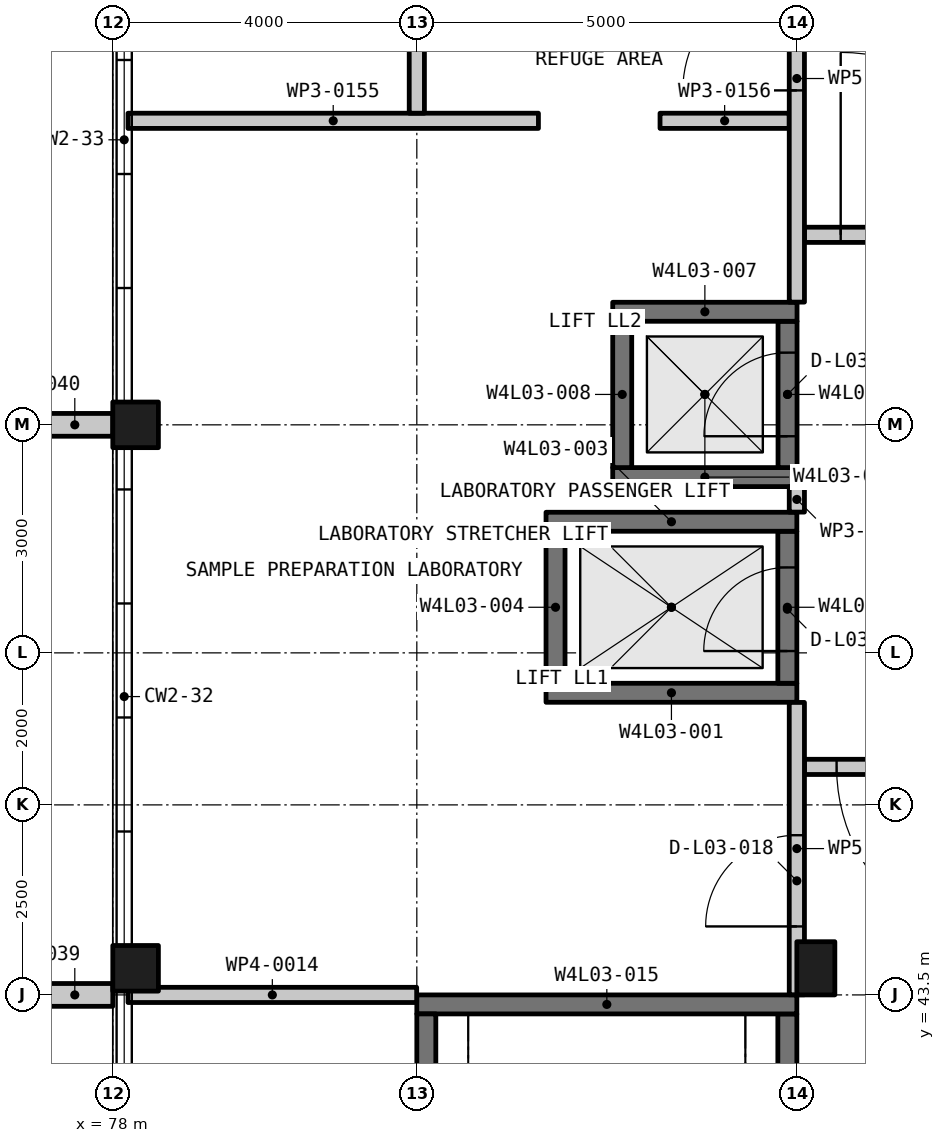
"""IFC4 building model, lengths in metres.
Left out: names, types, materials, properties, quantities, classifications, styles, units other than length and angle.
Written with IfcOpenShell. Run it as: python <this file> out.ifc"""

import sys

from ifc_helpers import new_model, si_unit, direction, frame, frame_2d, origin, origin_2d, place, context, subcontext, project, spatial, rectangle, extrude, element, fill, save


model = new_model("IFC4")
c1 = context("Model", 3, precision=1e-05, world=origin(), true_north=direction((0.0, 1.0)))
c2 = subcontext(c1, "Body", "Model", "MODEL_VIEW")
j1 = project(units=[si_unit("LENGTHUNIT", "METRE"), si_unit("PLANEANGLEUNIT", "RADIAN")], contexts=[c1])
p1 = place(None, origin())
s1 = spatial("IfcSite", under=j1, at=p1, CompositionType="ELEMENT")
p2 = place(p1, origin())
s2 = spatial("IfcBuilding", under=s1, at=p2, CompositionType="ELEMENT")
p3 = place(p2, frame((0.0, 0.0, 15.75)))
s3 = spatial("IfcBuildingStorey", under=s2, at=p3, CompositionType="ELEMENT", Elevation=15.75)
for number, where, z_axis, x_axis in (
    (1, (78.3, 43.85, -0.3), (0.0, 0.0, 1.0), (1.0, 0.0, 0.0)),
    (2, (78.3, 51.0, -0.3), (0.0, 0.0, 1.0), (1.0, 0.0, 0.0)),
):
    element("IfcColumn", number, at=place(p3, frame(where, z_axis=z_axis, x_axis=x_axis)), inside=s3, PredefinedType="COLUMN", context=c2, shape_type="SweptSolid", body=[
        extrude(rectangle(XDim=0.6, YDim=0.6, at=origin_2d()), origin(), (0.0, 0.0, 1.0), 4.5),
    ])
p4 = place(p3, frame((87.25, 43.85, -0.3), z_axis=(0.0, 0.0, 1.0), x_axis=(1.0, 0.0, 0.0)))
e3 = element("IfcColumn", 3, at=p4, inside=s3, PredefinedType="COLUMN", context=c2, shape_type="SweptSolid", body=[
    extrude(rectangle(XDim=0.5, YDim=0.7, at=origin_2d()), origin(), (0.0, 0.0, 1.0), 4.5),
])
p5 = place(p3, frame((83.7, 47.475, -0.3), z_axis=(0.0, 0.0, 1.0), x_axis=(1.0, 0.0, 0.0)))
e4 = element("IfcWall", 4, at=p5, inside=s3, PredefinedType="SHEAR", context=c2, shape_type="SweptSolid", body=[
    extrude(rectangle(XDim=3.3, YDim=0.25, at=frame_2d((1.65, 0.0))), origin(), (0.0, 0.0, 1.0), 4.5),
])
p6 = place(p3, frame((86.875, 47.6, -0.3), z_axis=(0.0, 0.0, 1.0), x_axis=(0.0, 1.0, 0.0)))
e5 = element("IfcWall", 5, at=p6, inside=s3, PredefinedType="SHEAR", context=c2, shape_type="SweptSolid", body=[
    extrude(rectangle(XDim=2.0, YDim=0.25, at=frame_2d((1.0, 0.0))), origin(), (0.0, 0.0, 1.0), 4.5),
])
p7 = place(p6, frame((0.424, 0.0, 0.3)))
e6 = element("IfcOpeningElement", 6, at=p7, cuts=e5, PredefinedType="OPENING", context=c2, shape_type="SweptSolid", body=[
    extrude(rectangle(XDim=1.1, YDim=2.1, at=frame_2d((0.55, 1.05))), frame((0.0, 0.135, 0.0), z_axis=(0.0, -1.0, 0.0), x_axis=(1.0, 0.0, 0.0)), (0.0, 0.0, 1.0), 0.27),
])
p8 = place(p3, frame((83.7, 49.725, -0.3), z_axis=(0.0, 0.0, 1.0), x_axis=(1.0, 0.0, 0.0)))
e7 = element("IfcWall", 7, at=p8, inside=s3, PredefinedType="SHEAR", context=c2, shape_type="SweptSolid", body=[
    extrude(rectangle(XDim=3.3, YDim=0.25, at=frame_2d((1.65, 0.0))), origin(), (0.0, 0.0, 1.0), 4.5),
])
p9 = place(p3, frame((83.825, 47.6, -0.3), z_axis=(0.0, 0.0, 1.0), x_axis=(0.0, 1.0, 0.0)))
e8 = element("IfcWall", 8, at=p9, inside=s3, PredefinedType="SHEAR", context=c2, shape_type="SweptSolid", body=[
    extrude(rectangle(XDim=2.0, YDim=0.25, at=frame_2d((1.0, 0.0))), origin(), (0.0, 0.0, 1.0), 4.5),
])
p10 = place(p3, frame((84.577, 50.312, -0.3), z_axis=(0.0, 0.0, 1.0), x_axis=(1.0, 0.0, 0.0)))
e9 = element("IfcWall", 9, at=p10, inside=s3, PredefinedType="SHEAR", context=c2, shape_type="SweptSolid", body=[
    extrude(rectangle(XDim=2.425, YDim=0.25, at=frame_2d((1.212, 0.0))), origin(), (0.0, 0.0, 1.0), 4.5),
])
p11 = place(p3, frame((86.877, 50.438, -0.3), z_axis=(0.0, 0.0, 1.0), x_axis=(0.0, 1.0, 0.0)))
e10 = element("IfcWall", 10, at=p11, inside=s3, PredefinedType="SHEAR", context=c2, shape_type="SweptSolid", body=[
    extrude(rectangle(XDim=1.925, YDim=0.25, at=frame_2d((0.962, 0.0))), origin(), (0.0, 0.0, 1.0), 4.5),
])
p12 = place(p11, frame((0.413, 0.0, 0.3)))
e11 = element("IfcOpeningElement", 11, at=p12, cuts=e10, PredefinedType="OPENING", context=c2, shape_type="SweptSolid", body=[
    extrude(rectangle(XDim=1.1, YDim=2.1, at=frame_2d((0.55, 1.05))), frame((0.0, 0.135, 0.0), z_axis=(0.0, -1.0, 0.0), x_axis=(1.0, 0.0, 0.0)), (0.0, 0.0, 1.0), 0.27),
])
p13 = place(p3, frame((84.577, 52.488, -0.3), z_axis=(0.0, 0.0, 1.0), x_axis=(1.0, 0.0, 0.0)))
e12 = element("IfcWall", 12, at=p13, inside=s3, PredefinedType="SHEAR", context=c2, shape_type="SweptSolid", body=[
    extrude(rectangle(XDim=2.425, YDim=0.25, at=frame_2d((1.212, 0.0))), origin(), (0.0, 0.0, 1.0), 4.5),
])
p14 = place(p3, frame((84.702, 50.438, -0.3), z_axis=(0.0, 0.0, 1.0), x_axis=(0.0, 1.0, 0.0)))
e13 = element("IfcWall", 13, at=p14, inside=s3, PredefinedType="SHEAR", context=c2, shape_type="SweptSolid", body=[
    extrude(rectangle(XDim=1.925, YDim=0.25, at=frame_2d((0.962, 0.0))), origin(), (0.0, 0.0, 1.0), 4.5),
])
p15 = place(p3, frame((86.875, 36.25, -0.3), z_axis=(0.0, 0.0, 1.0), x_axis=(0.0, 1.0, 0.0)))
e14 = element("IfcWall", 14, at=p15, inside=s3, PredefinedType="SHEAR", context=c2, shape_type="SweptSolid", body=[
    extrude(rectangle(XDim=7.0, YDim=0.25, at=frame_2d((3.5, 0.0))), origin(), (0.0, 0.0, 1.0), 4.5),
])
p16 = place(p3, frame((82.0, 43.375, -0.3), z_axis=(0.0, 0.0, 1.0), x_axis=(1.0, 0.0, 0.0)))
e15 = element("IfcWall", 15, at=p16, inside=s3, PredefinedType="SHEAR", context=c2, shape_type="SweptSolid", body=[
    extrude(rectangle(XDim=5.0, YDim=0.25, at=frame_2d((2.5, 0.0))), origin(), (0.0, 0.0, 1.0), 4.5),
])
p17 = place(p3, frame((82.125, 36.25, -0.3), z_axis=(0.0, 0.0, 1.0), x_axis=(0.0, 1.0, 0.0)))
e16 = element("IfcWall", 16, at=p17, inside=s3, PredefinedType="SHEAR", context=c2, shape_type="SweptSolid", body=[
    extrude(rectangle(XDim=7.0, YDim=0.25, at=frame_2d((3.5, 0.0))), origin(), (0.0, 0.0, 1.0), 4.5),
])
for number, where, z_axis, x_axis in (
    (17, (77.0, 43.5, 0.0), (0.0, 0.0, 1.0), (1.0, 0.0, 0.0)),
    (18, (77.0, 51.0, 0.0), (0.0, 0.0, 1.0), (1.0, 0.0, 0.0)),
):
    element("IfcWall", number, at=place(p3, frame(where, z_axis=z_axis, x_axis=x_axis)), inside=s3, PredefinedType="SOLIDWALL", context=c2, shape_type="SweptSolid", body=[
        extrude(rectangle(XDim=1.0, YDim=0.3, at=frame_2d((0.5, 0.0))), origin(), (0.0, 0.0, 1.0), 4.5),
    ])
p18 = place(p3, frame((78.2, 43.5, 0.0), z_axis=(0.0, 0.0, 1.0), x_axis=(1.0, 0.0, 0.0)))
e19 = element("IfcWall", 19, at=p18, inside=s3, PredefinedType="PARTITIONING", context=c2, shape_type="SweptSolid", body=[
    extrude(rectangle(XDim=3.798, YDim=0.2, at=frame_2d((1.899, 0.0))), origin(), (0.0, 0.0, 1.0), 3.4),
])
p19 = place(p3, frame((90.4, 46.5, 0.0), z_axis=(0.0, 0.0, 1.0), x_axis=(-1.0, 0.0, 0.0)))
e20 = element("IfcWall", 20, at=p19, inside=s3, PredefinedType="PARTITIONING", context=c2, shape_type="SweptSolid", body=[
    extrude(rectangle(XDim=3.3, YDim=0.2, at=frame_2d((1.65, 0.0))), origin(), (0.0, 0.0, 1.0), 3.4),
])
p20 = place(p19, frame((0.477, 0.0, 0.0)))
e21 = element("IfcOpeningElement", 21, at=p20, cuts=e20, PredefinedType="OPENING", context=c2, shape_type="SweptSolid", body=[
    extrude(rectangle(XDim=2.4, YDim=2.1, at=frame_2d((1.2, 1.05))), frame((0.0, 0.11, 0.0), z_axis=(0.0, -1.0, 0.0), x_axis=(1.0, 0.0, 0.0)), (0.0, 0.0, 1.0), 0.22),
])
p21 = place(p3, frame((87.1, 53.5, 0.0), z_axis=(0.0, 0.0, 1.0), x_axis=(1.0, 0.0, 0.0)))
e22 = element("IfcWall", 22, at=p21, inside=s3, PredefinedType="PARTITIONING", context=c2, shape_type="SweptSolid", body=[
    extrude(rectangle(XDim=3.3, YDim=0.2, at=frame_2d((1.65, 0.0))), origin(), (0.0, 0.0, 1.0), 3.4),
])
p22 = place(p21, frame((0.477, 0.0, 0.0)))
e23 = element("IfcOpeningElement", 23, at=p22, cuts=e22, PredefinedType="OPENING", context=c2, shape_type="SweptSolid", body=[
    extrude(rectangle(XDim=2.4, YDim=2.1, at=frame_2d((1.2, 1.05))), frame((0.0, 0.11, 0.0), z_axis=(0.0, -1.0, 0.0), x_axis=(1.0, 0.0, 0.0)), (0.0, 0.0, 1.0), 0.22),
])
p23 = place(p3, frame((78.2, 55.0, 0.0), z_axis=(0.0, 0.0, 1.0), x_axis=(1.0, 0.0, 0.0)))
e24 = element("IfcWall", 24, at=p23, inside=s3, PredefinedType="PARTITIONING", context=c2, shape_type="SweptSolid", body=[
    extrude(rectangle(XDim=5.4, YDim=0.2, at=frame_2d((2.7, 0.0))), origin(), (0.0, 0.0, 1.0), 3.4),
])
p24 = place(p3, frame((85.2, 55.0, 0.0), z_axis=(0.0, 0.0, 1.0), x_axis=(1.0, 0.0, 0.0)))
e25 = element("IfcWall", 25, at=p24, inside=s3, PredefinedType="PARTITIONING", context=c2, shape_type="SweptSolid", body=[
    extrude(rectangle(XDim=1.7, YDim=0.2, at=frame_2d((0.85, 0.0))), origin(), (0.0, 0.0, 1.0), 3.6),
])
p25 = place(p3, frame((87.0, 43.502, 0.0), z_axis=(0.0, 0.0, 1.0), x_axis=(0.0, 1.0, 0.0)))
e26 = element("IfcWall", 26, at=p25, inside=s3, PredefinedType="PARTITIONING", context=c2, shape_type="SweptSolid", body=[
    extrude(rectangle(XDim=3.846, YDim=0.2, at=frame_2d((1.923, 0.0))), origin(), (0.0, 0.0, 1.0), 3.4),
])
p26 = place(p25, frame((0.899, 0.0, 0.0)))
e27 = element("IfcOpeningElement", 27, at=p26, cuts=e26, PredefinedType="OPENING", context=c2, shape_type="SweptSolid", body=[
    extrude(rectangle(XDim=1.2, YDim=2.1, at=frame_2d((0.6, 1.05))), frame((0.0, 0.11, 0.0), z_axis=(0.0, -1.0, 0.0), x_axis=(1.0, 0.0, 0.0)), (0.0, 0.0, 1.0), 0.22),
])
p27 = place(p3, frame((87.0, 49.852, 0.0), z_axis=(0.0, 0.0, 1.0), x_axis=(0.0, 1.0, 0.0)))
e28 = element("IfcWall", 28, at=p27, inside=s3, PredefinedType="PARTITIONING", context=c2, shape_type="SweptSolid", body=[
    extrude(rectangle(XDim=0.333, YDim=0.2, at=frame_2d((0.167, 0.0))), origin(), (0.0, 0.0, 1.0), 3.4),
])
p28 = place(p3, frame((87.0, 52.615, 0.0), z_axis=(0.0, 0.0, 1.0), x_axis=(0.0, 1.0, 0.0)))
e29 = element("IfcWall", 29, at=p28, inside=s3, PredefinedType="PARTITIONING", context=c2, shape_type="SweptSolid", body=[
    extrude(rectangle(XDim=5.884, YDim=0.2, at=frame_2d((2.942, 0.0))), origin(), (0.0, 0.0, 1.0), 3.4),
])
p29 = place(p28, frame((2.785, 0.0, 0.0)))
e30 = element("IfcOpeningElement", 30, at=p29, cuts=e29, PredefinedType="OPENING", context=c2, shape_type="SweptSolid", body=[
    extrude(rectangle(XDim=1.5, YDim=2.1, at=frame_2d((0.75, 1.05))), frame((0.0, 0.11, 0.0), z_axis=(0.0, -1.0, 0.0), x_axis=(1.0, 0.0, 0.0)), (0.0, 0.0, 1.0), 0.22),
])
p30 = place(p3, frame((82.0, 55.1, 0.0), z_axis=(0.0, 0.0, 1.0), x_axis=(0.0, 1.0, 0.0)))
e31 = element("IfcWall", 31, at=p30, inside=s3, PredefinedType="PARTITIONING", context=c2, shape_type="SweptSolid", body=[
    extrude(rectangle(XDim=3.398, YDim=0.2, at=frame_2d((1.699, 0.0))), origin(), (0.0, 0.0, 1.0), 3.4),
])
p31 = place(p30, frame((1.051, 0.0, 0.0)))
e32 = element("IfcOpeningElement", 32, at=p31, cuts=e31, PredefinedType="OPENING", context=c2, shape_type="SweptSolid", body=[
    extrude(rectangle(XDim=1.2, YDim=2.1, at=frame_2d((0.6, 1.05))), frame((0.0, 0.11, 0.0), z_axis=(0.0, -1.0, 0.0), x_axis=(1.0, 0.0, 0.0)), (0.0, 0.0, 1.0), 0.22),
])
p32 = place(p22, origin())
e33 = element("IfcDoor", 33, at=p32, inside=s3, OperationType="DOUBLE_DOOR_SINGLE_SWING", PredefinedType="DOOR", context=c2, shape_type="SweptSolid", body=[
    extrude(rectangle(XDim=2.4, YDim=2.1, at=frame_2d((1.2, 1.05))), frame((0.0, 0.025, 0.0), z_axis=(0.0, -1.0, 0.0), x_axis=(1.0, 0.0, 0.0)), (0.0, 0.0, 1.0), 0.05),
])
fill(e23, e33)
p33 = place(p7, origin())
e34 = element("IfcDoor", 34, at=p33, inside=s3, OperationType="DOUBLE_DOOR_SLIDING", PredefinedType="DOOR", context=c2, shape_type="SweptSolid", body=[
    extrude(rectangle(XDim=1.1, YDim=2.1, at=frame_2d((0.55, 1.05))), frame((0.0, 0.025, 0.0), z_axis=(0.0, -1.0, 0.0), x_axis=(1.0, 0.0, 0.0)), (0.0, 0.0, 1.0), 0.05),
])
fill(e6, e34)
p34 = place(p12, origin())
e35 = element("IfcDoor", 35, at=p34, inside=s3, OperationType="DOUBLE_DOOR_SLIDING", PredefinedType="DOOR", context=c2, shape_type="SweptSolid", body=[
    extrude(rectangle(XDim=1.1, YDim=2.1, at=frame_2d((0.55, 1.05))), frame((0.0, 0.025, 0.0), z_axis=(0.0, -1.0, 0.0), x_axis=(1.0, 0.0, 0.0)), (0.0, 0.0, 1.0), 0.05),
])
fill(e11, e35)
p35 = place(p20, origin())
e36 = element("IfcDoor", 36, at=p35, inside=s3, OperationType="DOUBLE_DOOR_SINGLE_SWING", PredefinedType="DOOR", context=c2, shape_type="SweptSolid", body=[
    extrude(rectangle(XDim=2.4, YDim=2.1, at=frame_2d((1.2, 1.05))), frame((0.0, 0.025, 0.0), z_axis=(0.0, -1.0, 0.0), x_axis=(1.0, 0.0, 0.0)), (0.0, 0.0, 1.0), 0.05),
])
fill(e21, e36)
p36 = place(p29, origin())
e37 = element("IfcDoor", 37, at=p36, inside=s3, OperationType="DOUBLE_DOOR_SINGLE_SWING", PredefinedType="DOOR", context=c2, shape_type="SweptSolid", body=[
    extrude(rectangle(XDim=1.5, YDim=2.1, at=frame_2d((0.75, 1.05))), frame((0.0, 0.025, 0.0), z_axis=(0.0, -1.0, 0.0), x_axis=(1.0, 0.0, 0.0)), (0.0, 0.0, 1.0), 0.05),
])
fill(e30, e37)
p37 = place(p26, origin())
e38 = element("IfcDoor", 38, at=p37, inside=s3, OperationType="SINGLE_SWING_RIGHT", PredefinedType="DOOR", context=c2, shape_type="SweptSolid", body=[
    extrude(rectangle(XDim=1.2, YDim=2.1, at=frame_2d((0.6, 1.05))), frame((0.0, 0.025, 0.0), z_axis=(0.0, -1.0, 0.0), x_axis=(1.0, 0.0, 0.0)), (0.0, 0.0, 1.0), 0.05),
])
fill(e27, e38)
save(model, sys.argv[1])
